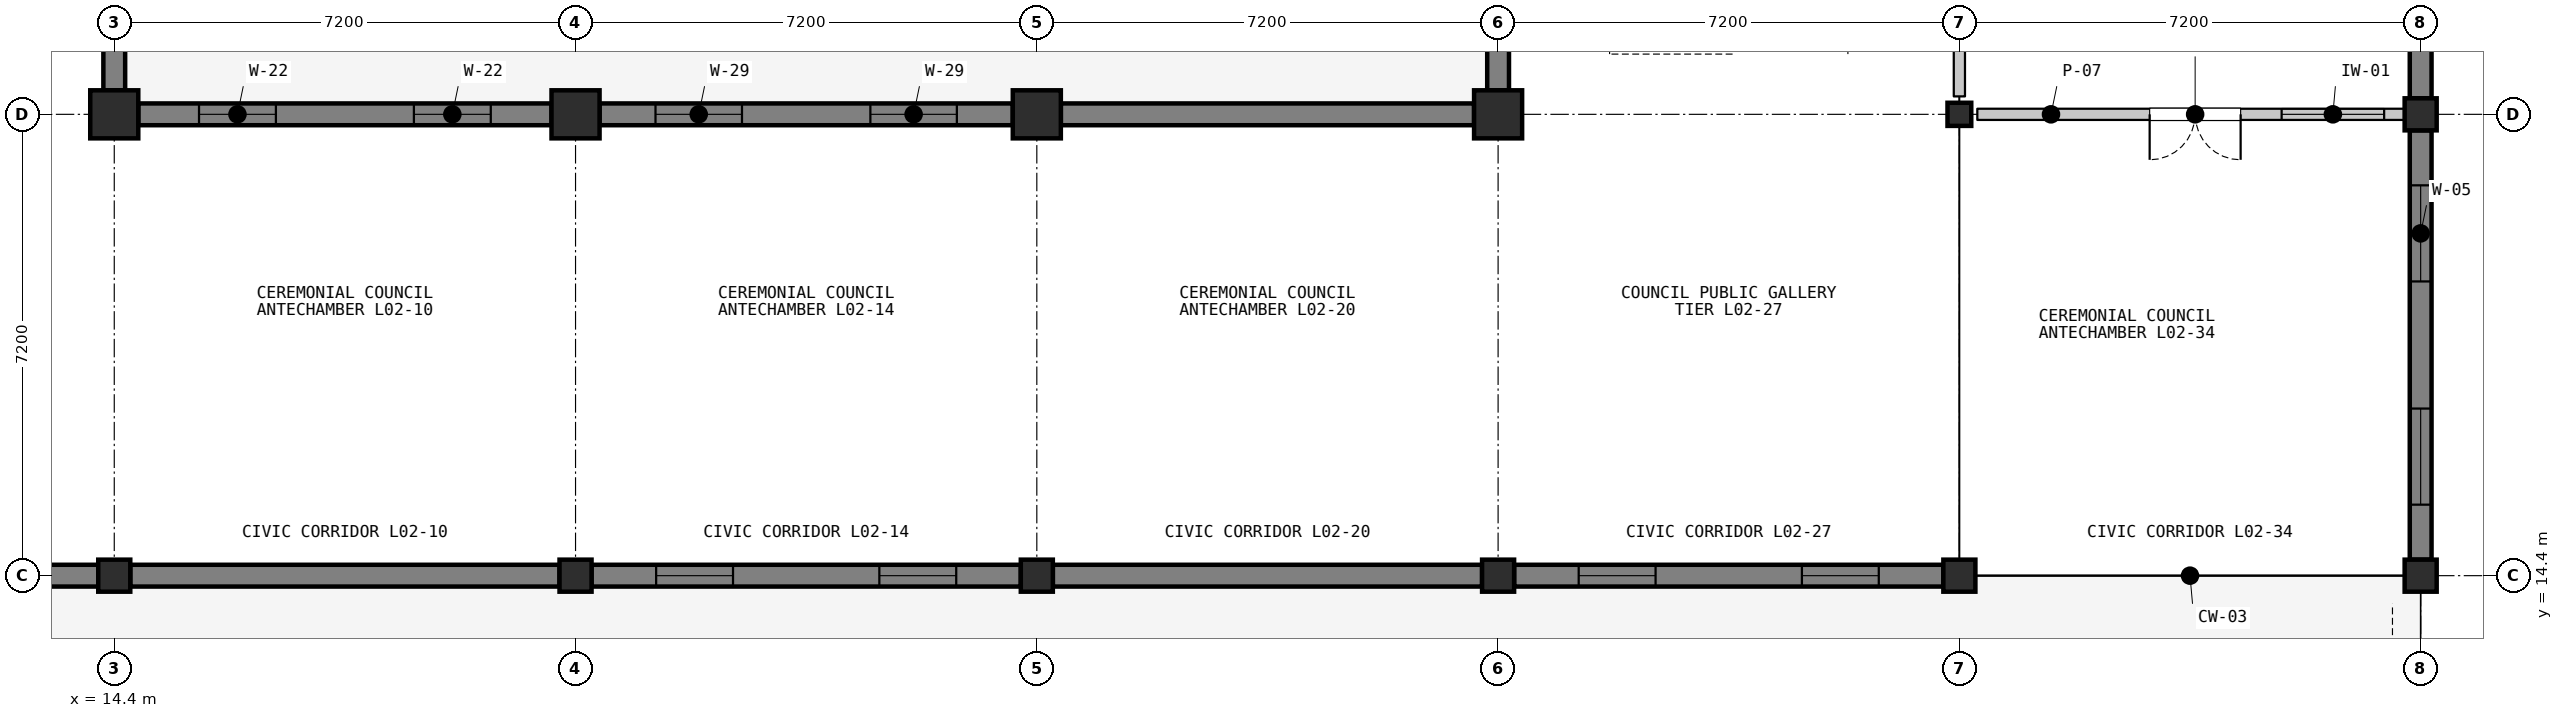
"""IFC4 building model, lengths in metres.
Left out: names, types, materials, properties, quantities, classifications, styles, units other than length and angle.
Written with IfcOpenShell. Run it as: python <this file> out.ifc"""

import sys

from ifc_helpers import new_model, si_unit, direction, frame, frame_2d, origin, origin_2d, place, context, subcontext, project, spatial, rectangle, i_section, extrude, element, fill, save


model = new_model("IFC4")
c1 = context("Model", 3, precision=1e-05, world=origin(), true_north=direction((0.0, 1.0)))
c2 = subcontext(c1, "Body", "Model", "MODEL_VIEW")
j1 = project(units=[si_unit("LENGTHUNIT", "METRE"), si_unit("PLANEANGLEUNIT", "RADIAN")], contexts=[c1])
p1 = place(None, origin())
s1 = spatial("IfcSite", under=j1, at=p1, CompositionType="ELEMENT")
p2 = place(p1, origin())
s2 = spatial("IfcBuilding", under=s1, at=p2, CompositionType="ELEMENT")
p3 = place(p2, frame((0.0, 0.0, 5.4)))
s3 = spatial("IfcBuildingStorey", under=s2, at=p3, CompositionType="ELEMENT", Elevation=5.4)
p4 = place(p3, frame((14.4, 14.4, 0.0), z_axis=(0.0, 0.0, 1.0), x_axis=(1.0, 0.0, 0.0)))
e1 = element("IfcColumn", 1, at=p4, inside=s3, PredefinedType="COLUMN", context=c2, shape_type="SweptSolid", body=[
    extrude(rectangle(XDim=0.5, YDim=0.5, at=origin_2d()), origin(), (0.0, 0.0, 1.0), 4.5),
])
p5 = place(p3, frame((14.4, 21.6, 0.0), z_axis=(0.0, 0.0, 1.0), x_axis=(1.0, 0.0, 0.0)))
e2 = element("IfcColumn", 2, at=p5, inside=s3, PredefinedType="COLUMN", context=c2, shape_type="SweptSolid", body=[
    extrude(rectangle(XDim=0.75, YDim=0.75, at=origin_2d()), origin(), (0.0, 0.0, 1.0), 4.5),
])
p6 = place(p3, frame((21.6, 14.4, 0.0), z_axis=(0.0, 0.0, 1.0), x_axis=(1.0, 0.0, 0.0)))
e3 = element("IfcColumn", 3, at=p6, inside=s3, PredefinedType="COLUMN", context=c2, shape_type="SweptSolid", body=[
    extrude(rectangle(XDim=0.5, YDim=0.5, at=origin_2d()), origin(), (0.0, 0.0, 1.0), 4.5),
])
p7 = place(p3, frame((21.6, 21.6, 0.0), z_axis=(0.0, 0.0, 1.0), x_axis=(1.0, 0.0, 0.0)))
e4 = element("IfcColumn", 4, at=p7, inside=s3, PredefinedType="COLUMN", context=c2, shape_type="SweptSolid", body=[
    extrude(rectangle(XDim=0.75, YDim=0.75, at=origin_2d()), origin(), (0.0, 0.0, 1.0), 4.5),
])
p8 = place(p3, frame((28.8, 14.4, 0.0), z_axis=(0.0, 0.0, 1.0), x_axis=(1.0, 0.0, 0.0)))
e5 = element("IfcColumn", 5, at=p8, inside=s3, PredefinedType="COLUMN", context=c2, shape_type="SweptSolid", body=[
    extrude(rectangle(XDim=0.5, YDim=0.5, at=origin_2d()), origin(), (0.0, 0.0, 1.0), 4.5),
])
p9 = place(p3, frame((28.8, 21.6, 0.0), z_axis=(0.0, 0.0, 1.0), x_axis=(1.0, 0.0, 0.0)))
e6 = element("IfcColumn", 6, at=p9, inside=s3, PredefinedType="COLUMN", context=c2, shape_type="SweptSolid", body=[
    extrude(rectangle(XDim=0.75, YDim=0.75, at=origin_2d()), origin(), (0.0, 0.0, 1.0), 4.5),
])
p10 = place(p3, frame((36.0, 14.4, 0.0), z_axis=(0.0, 0.0, 1.0), x_axis=(1.0, 0.0, 0.0)))
e7 = element("IfcColumn", 7, at=p10, inside=s3, PredefinedType="COLUMN", context=c2, shape_type="SweptSolid", body=[
    extrude(rectangle(XDim=0.5, YDim=0.5, at=origin_2d()), origin(), (0.0, 0.0, 1.0), 4.5),
])
p11 = place(p3, frame((36.0, 21.6, 0.0), z_axis=(0.0, 0.0, 1.0), x_axis=(1.0, 0.0, 0.0)))
e8 = element("IfcColumn", 8, at=p11, inside=s3, PredefinedType="COLUMN", context=c2, shape_type="SweptSolid", body=[
    extrude(rectangle(XDim=0.75, YDim=0.75, at=origin_2d()), origin(), (0.0, 0.0, 1.0), 4.5),
])
p12 = place(p3, frame((43.2, 14.4, 0.0), z_axis=(0.0, 0.0, 1.0), x_axis=(1.0, 0.0, 0.0)))
e9 = element("IfcColumn", 9, at=p12, inside=s3, PredefinedType="COLUMN", context=c2, shape_type="SweptSolid", body=[
    extrude(rectangle(XDim=0.5, YDim=0.5, at=origin_2d()), origin(), (0.0, 0.0, 1.0), 4.5),
])
p13 = place(p3, frame((43.2, 21.6, 0.0), z_axis=(0.0, 0.0, 1.0), x_axis=(1.0, 0.0, 0.0)))
e10 = element("IfcColumn", 10, at=p13, inside=s3, PredefinedType="COLUMN", context=c2, shape_type="SweptSolid", body=[
    extrude(i_section(OverallWidth=0.371, OverallDepth=0.361, WebThickness=0.012, FlangeThickness=0.02, FilletRadius=0.015, at=origin_2d()), origin(), (0.0, 0.0, 1.0), 4.5),
])
for number, where, z_axis, x_axis in (
    (11, (50.4, 14.4, 0.0), (0.0, 0.0, 1.0), (1.0, 0.0, 0.0)),
    (12, (50.4, 21.6, 0.0), (0.0, 0.0, 1.0), (1.0, 0.0, 0.0)),
):
    element("IfcColumn", number, at=place(p3, frame(where, z_axis=z_axis, x_axis=x_axis)), inside=s3, PredefinedType="COLUMN", context=c2, shape_type="SweptSolid", body=[
        extrude(rectangle(XDim=0.5, YDim=0.5, at=origin_2d()), origin(), (0.0, 0.0, 1.0), 4.5),
    ])
p14 = place(p3, frame((14.15, 14.4, 0.0), z_axis=(0.0, 0.0, 1.0), x_axis=(-1.0, 0.0, 0.0)))
e13 = element("IfcWall", 13, at=p14, inside=s3, PredefinedType="SOLIDWALL", context=c2, shape_type="SweptSolid", body=[
    extrude(rectangle(XDim=6.7, YDim=0.34, at=frame_2d((3.35, 0.0))), origin(), (0.0, 0.0, 1.0), 3.698),
])
p15 = place(p14, frame((2.5, 0.0, 0.0)))
e14 = element("IfcOpeningElement", 14, at=p15, cuts=e13, PredefinedType="OPENING", context=c2, shape_type="SweptSolid", body=[
    extrude(rectangle(XDim=1.7, YDim=2.25, at=frame_2d((0.85, 1.125))), frame((0.0, 0.18, 0.0), z_axis=(0.0, -1.0, 0.0), x_axis=(1.0, 0.0, 0.0)), (0.0, 0.0, 1.0), 0.36),
])
p16 = place(p3, frame((14.4, 28.425, 0.0), z_axis=(0.0, 0.0, 1.0), x_axis=(0.0, -1.0, 0.0)))
e15 = element("IfcWall", 15, at=p16, inside=s3, PredefinedType="SOLIDWALL", context=c2, shape_type="SweptSolid", body=[
    extrude(rectangle(XDim=6.45, YDim=0.34, at=frame_2d((3.225, 0.0))), origin(), (0.0, 0.0, 1.0), 3.767),
])
p17 = place(p3, frame((21.35, 14.4, 0.0), z_axis=(0.0, 0.0, 1.0), x_axis=(-1.0, 0.0, 0.0)))
e16 = element("IfcWall", 16, at=p17, inside=s3, PredefinedType="SOLIDWALL", context=c2, shape_type="SweptSolid", body=[
    extrude(rectangle(XDim=6.7, YDim=0.34, at=frame_2d((3.35, 0.0))), origin(), (0.0, 0.0, 1.0), 3.698),
])
p18 = place(p3, frame((14.775, 21.6, 0.0), z_axis=(0.0, 0.0, 1.0), x_axis=(1.0, 0.0, 0.0)))
e17 = element("IfcWall", 17, at=p18, inside=s3, PredefinedType="SOLIDWALL", context=c2, shape_type="SweptSolid", body=[
    extrude(rectangle(XDim=6.45, YDim=0.34, at=frame_2d((3.225, 0.0))), origin(), (0.0, 0.0, 1.0), 3.698),
])
p19 = place(p18, frame((0.948, 0.0, 0.95)))
e18 = element("IfcOpeningElement", 18, at=p19, cuts=e17, PredefinedType="OPENING", context=c2, shape_type="SweptSolid", body=[
    extrude(rectangle(XDim=1.2, YDim=1.7, at=frame_2d((0.6, 0.85))), frame((0.0, 0.18, 0.0), z_axis=(0.0, -1.0, 0.0), x_axis=(1.0, 0.0, 0.0)), (0.0, 0.0, 1.0), 0.36),
])
p20 = place(p18, frame((4.302, 0.0, 0.95)))
e19 = element("IfcOpeningElement", 19, at=p20, cuts=e17, PredefinedType="OPENING", context=c2, shape_type="SweptSolid", body=[
    extrude(rectangle(XDim=1.2, YDim=1.7, at=frame_2d((0.6, 0.85))), frame((0.0, 0.18, 0.0), z_axis=(0.0, -1.0, 0.0), x_axis=(1.0, 0.0, 0.0)), (0.0, 0.0, 1.0), 0.36),
])
p21 = place(p3, frame((28.55, 14.4, 0.0), z_axis=(0.0, 0.0, 1.0), x_axis=(-1.0, 0.0, 0.0)))
e20 = element("IfcWall", 20, at=p21, inside=s3, PredefinedType="SOLIDWALL", context=c2, shape_type="SweptSolid", body=[
    extrude(rectangle(XDim=6.7, YDim=0.34, at=frame_2d((3.35, 0.0))), origin(), (0.0, 0.0, 1.0), 3.698),
])
p22 = place(p21, frame((1.008, 0.0, 0.95)))
e21 = element("IfcOpeningElement", 21, at=p22, cuts=e20, PredefinedType="OPENING", context=c2, shape_type="SweptSolid", body=[
    extrude(rectangle(XDim=1.2, YDim=1.7, at=frame_2d((0.6, 0.85))), frame((0.0, 0.18, 0.0), z_axis=(0.0, -1.0, 0.0), x_axis=(1.0, 0.0, 0.0)), (0.0, 0.0, 1.0), 0.36),
])
p23 = place(p21, frame((4.492, 0.0, 0.95)))
e22 = element("IfcOpeningElement", 22, at=p23, cuts=e20, PredefinedType="OPENING", context=c2, shape_type="SweptSolid", body=[
    extrude(rectangle(XDim=1.2, YDim=1.7, at=frame_2d((0.6, 0.85))), frame((0.0, 0.18, 0.0), z_axis=(0.0, -1.0, 0.0), x_axis=(1.0, 0.0, 0.0)), (0.0, 0.0, 1.0), 0.36),
])
p24 = place(p3, frame((21.975, 21.6, 0.0), z_axis=(0.0, 0.0, 1.0), x_axis=(1.0, 0.0, 0.0)))
e23 = element("IfcWall", 23, at=p24, inside=s3, PredefinedType="SOLIDWALL", context=c2, shape_type="SweptSolid", body=[
    extrude(rectangle(XDim=6.45, YDim=0.34, at=frame_2d((3.225, 0.0))), origin(), (0.0, 0.0, 1.0), 3.698),
])
p25 = place(p24, frame((0.873, 0.0, 0.95)))
e24 = element("IfcOpeningElement", 24, at=p25, cuts=e23, PredefinedType="OPENING", context=c2, shape_type="SweptSolid", body=[
    extrude(rectangle(XDim=1.35, YDim=2.15, at=frame_2d((0.675, 1.075))), frame((0.0, 0.18, 0.0), z_axis=(0.0, -1.0, 0.0), x_axis=(1.0, 0.0, 0.0)), (0.0, 0.0, 1.0), 0.36),
])
p26 = place(p24, frame((4.227, 0.0, 0.95)))
e25 = element("IfcOpeningElement", 25, at=p26, cuts=e23, PredefinedType="OPENING", context=c2, shape_type="SweptSolid", body=[
    extrude(rectangle(XDim=1.35, YDim=2.15, at=frame_2d((0.675, 1.075))), frame((0.0, 0.18, 0.0), z_axis=(0.0, -1.0, 0.0), x_axis=(1.0, 0.0, 0.0)), (0.0, 0.0, 1.0), 0.36),
])
p27 = place(p3, frame((35.75, 14.4, 0.0), z_axis=(0.0, 0.0, 1.0), x_axis=(-1.0, 0.0, 0.0)))
e26 = element("IfcWall", 26, at=p27, inside=s3, PredefinedType="SOLIDWALL", context=c2, shape_type="SweptSolid", body=[
    extrude(rectangle(XDim=6.7, YDim=0.34, at=frame_2d((3.35, 0.0))), origin(), (0.0, 0.0, 1.0), 3.698),
])
p28 = place(p3, frame((29.175, 21.6, 0.0), z_axis=(0.0, 0.0, 1.0), x_axis=(1.0, 0.0, 0.0)))
e27 = element("IfcWall", 27, at=p28, inside=s3, PredefinedType="SOLIDWALL", context=c2, shape_type="SweptSolid", body=[
    extrude(rectangle(XDim=6.45, YDim=0.34, at=frame_2d((3.225, 0.0))), origin(), (0.0, 0.0, 1.0), 3.698),
])
p29 = place(p3, frame((42.95, 14.4, 0.0), z_axis=(0.0, 0.0, 1.0), x_axis=(-1.0, 0.0, 0.0)))
e28 = element("IfcWall", 28, at=p29, inside=s3, PredefinedType="SOLIDWALL", context=c2, shape_type="SweptSolid", body=[
    extrude(rectangle(XDim=6.7, YDim=0.34, at=frame_2d((3.35, 0.0))), origin(), (0.0, 0.0, 1.0), 3.698),
])
p30 = place(p29, frame((1.008, 0.0, 0.95)))
e29 = element("IfcOpeningElement", 29, at=p30, cuts=e28, PredefinedType="OPENING", context=c2, shape_type="SweptSolid", body=[
    extrude(rectangle(XDim=1.2, YDim=1.7, at=frame_2d((0.6, 0.85))), frame((0.0, 0.18, 0.0), z_axis=(0.0, -1.0, 0.0), x_axis=(1.0, 0.0, 0.0)), (0.0, 0.0, 1.0), 0.36),
])
p31 = place(p29, frame((4.492, 0.0, 0.95)))
e30 = element("IfcOpeningElement", 30, at=p31, cuts=e28, PredefinedType="OPENING", context=c2, shape_type="SweptSolid", body=[
    extrude(rectangle(XDim=1.2, YDim=1.7, at=frame_2d((0.6, 0.85))), frame((0.0, 0.18, 0.0), z_axis=(0.0, -1.0, 0.0), x_axis=(1.0, 0.0, 0.0)), (0.0, 0.0, 1.0), 0.36),
])
p32 = place(p3, frame((36.0, 21.975, 0.0), z_axis=(0.0, 0.0, 1.0), x_axis=(0.0, 1.0, 0.0)))
e31 = element("IfcWall", 31, at=p32, inside=s3, PredefinedType="SOLIDWALL", context=c2, shape_type="SweptSolid", body=[
    extrude(rectangle(XDim=6.45, YDim=0.34, at=frame_2d((3.225, 0.0))), origin(), (0.0, 0.0, 1.0), 3.767),
])
p33 = place(p32, frame((0.873, 0.0, 0.95)))
e32 = element("IfcOpeningElement", 32, at=p33, cuts=e31, PredefinedType="OPENING", context=c2, shape_type="SweptSolid", body=[
    extrude(rectangle(XDim=1.35, YDim=2.15, at=frame_2d((0.675, 1.075))), frame((0.0, 0.18, 0.0), z_axis=(0.0, -1.0, 0.0), x_axis=(1.0, 0.0, 0.0)), (0.0, 0.0, 1.0), 0.36),
])
p34 = place(p32, frame((4.227, 0.0, 0.95)))
e33 = element("IfcOpeningElement", 33, at=p34, cuts=e31, PredefinedType="OPENING", context=c2, shape_type="SweptSolid", body=[
    extrude(rectangle(XDim=1.35, YDim=2.15, at=frame_2d((0.675, 1.075))), frame((0.0, 0.18, 0.0), z_axis=(0.0, -1.0, 0.0), x_axis=(1.0, 0.0, 0.0)), (0.0, 0.0, 1.0), 0.36),
])
p35 = place(p3, frame((50.4, 21.35, 0.0), z_axis=(0.0, 0.0, 1.0), x_axis=(0.0, -1.0, 0.0)))
e34 = element("IfcWall", 34, at=p35, inside=s3, PredefinedType="SOLIDWALL", context=c2, shape_type="SweptSolid", body=[
    extrude(rectangle(XDim=6.7, YDim=0.34, at=frame_2d((3.35, 0.0))), origin(), (0.0, 0.0, 1.0), 3.767),
])
p36 = place(p35, frame((0.858, 0.0, 0.95)))
e35 = element("IfcOpeningElement", 35, at=p36, cuts=e34, PredefinedType="OPENING", context=c2, shape_type="SweptSolid", body=[
    extrude(rectangle(XDim=1.5, YDim=2.4, at=frame_2d((0.75, 1.2))), frame((0.0, 0.18, 0.0), z_axis=(0.0, -1.0, 0.0), x_axis=(1.0, 0.0, 0.0)), (0.0, 0.0, 1.0), 0.36),
])
p37 = place(p35, frame((4.342, 0.0, 0.95)))
e36 = element("IfcOpeningElement", 36, at=p37, cuts=e34, PredefinedType="OPENING", context=c2, shape_type="SweptSolid", body=[
    extrude(rectangle(XDim=1.5, YDim=2.4, at=frame_2d((0.75, 1.2))), frame((0.0, 0.18, 0.0), z_axis=(0.0, -1.0, 0.0), x_axis=(1.0, 0.0, 0.0)), (0.0, 0.0, 1.0), 0.36),
])
p38 = place(p3, frame((50.4, 28.55, 0.0), z_axis=(0.0, 0.0, 1.0), x_axis=(0.0, -1.0, 0.0)))
e37 = element("IfcWall", 37, at=p38, inside=s3, PredefinedType="SOLIDWALL", context=c2, shape_type="SweptSolid", body=[
    extrude(rectangle(XDim=6.7, YDim=0.34, at=frame_2d((3.35, 0.0))), origin(), (0.0, 0.0, 1.0), 3.767),
])
p39 = place(p38, frame((1.008, 0.0, 0.95)))
e38 = element("IfcOpeningElement", 38, at=p39, cuts=e37, PredefinedType="OPENING", context=c2, shape_type="SweptSolid", body=[
    extrude(rectangle(XDim=1.2, YDim=2.4, at=frame_2d((0.6, 1.2))), frame((0.0, 0.18, 0.0), z_axis=(0.0, -1.0, 0.0), x_axis=(1.0, 0.0, 0.0)), (0.0, 0.0, 1.0), 0.36),
])
p40 = place(p38, frame((4.492, 0.0, 0.95)))
e39 = element("IfcOpeningElement", 39, at=p40, cuts=e37, PredefinedType="OPENING", context=c2, shape_type="SweptSolid", body=[
    extrude(rectangle(XDim=1.2, YDim=2.4, at=frame_2d((0.6, 1.2))), frame((0.0, 0.18, 0.0), z_axis=(0.0, -1.0, 0.0), x_axis=(1.0, 0.0, 0.0)), (0.0, 0.0, 1.0), 0.36),
])
p41 = place(p3, frame((50.28, 21.6, 0.0), z_axis=(0.0, 0.0, 1.0), x_axis=(-1.0, 0.0, 0.0)))
e40 = element("IfcWall", 40, at=p41, inside=s3, PredefinedType="PARTITIONING", context=c2, shape_type="SweptSolid", body=[
    extrude(rectangle(XDim=6.8, YDim=0.175, at=frame_2d((3.4, 0.0))), origin(), (0.0, 0.0, 1.0), 3.688),
])
p42 = place(p41, frame((2.69, 0.0, 0.0)))
e41 = element("IfcOpeningElement", 41, at=p42, cuts=e40, PredefinedType="OPENING", context=c2, shape_type="SweptSolid", body=[
    extrude(rectangle(XDim=1.42, YDim=2.26, at=frame_2d((0.71, 1.13))), frame((0.0, 0.097, 0.0), z_axis=(0.0, -1.0, 0.0), x_axis=(1.0, 0.0, 0.0)), (0.0, 0.0, 1.0), 0.195),
])
p43 = place(p41, frame((0.45, 0.0, 1.05)))
e42 = element("IfcOpeningElement", 42, at=p43, cuts=e40, PredefinedType="OPENING", context=c2, shape_type="SweptSolid", body=[
    extrude(rectangle(XDim=1.6, YDim=1.2, at=frame_2d((0.8, 0.6))), frame((0.0, 0.097, 0.0), z_axis=(0.0, -1.0, 0.0), x_axis=(1.0, 0.0, 0.0)), (0.0, 0.0, 1.0), 0.195),
])
p44 = place(p3, frame((43.2, 21.88, 0.0), z_axis=(0.0, 0.0, 1.0), x_axis=(0.0, 1.0, 0.0)))
e43 = element("IfcWall", 43, at=p44, inside=s3, PredefinedType="PARTITIONING", context=c2, shape_type="SweptSolid", body=[
    extrude(rectangle(XDim=6.64, YDim=0.175, at=frame_2d((3.32, 0.0))), origin(), (0.0, 0.0, 1.0), 3.757),
])
p45 = place(p19, origin())
e44 = element("IfcWindow", 44, at=p45, inside=s3, PartitioningType="SINGLE_PANEL", PredefinedType="WINDOW", context=c2, shape_type="SweptSolid", body=[
    extrude(rectangle(XDim=1.2, YDim=1.7, at=frame_2d((0.6, 0.85))), frame((0.0, 0.03, 0.0), z_axis=(0.0, -1.0, 0.0), x_axis=(1.0, 0.0, 0.0)), (0.0, 0.0, 1.0), 0.06),
])
fill(e18, e44)
p46 = place(p20, origin())
e45 = element("IfcWindow", 45, at=p46, inside=s3, PartitioningType="SINGLE_PANEL", PredefinedType="WINDOW", context=c2, shape_type="SweptSolid", body=[
    extrude(rectangle(XDim=1.2, YDim=1.7, at=frame_2d((0.6, 0.85))), frame((0.0, 0.03, 0.0), z_axis=(0.0, -1.0, 0.0), x_axis=(1.0, 0.0, 0.0)), (0.0, 0.0, 1.0), 0.06),
])
fill(e19, e45)
p47 = place(p22, origin())
e46 = element("IfcWindow", 46, at=p47, inside=s3, PartitioningType="SINGLE_PANEL", PredefinedType="WINDOW", context=c2, shape_type="SweptSolid", body=[
    extrude(rectangle(XDim=1.2, YDim=1.7, at=frame_2d((0.6, 0.85))), frame((0.0, 0.03, 0.0), z_axis=(0.0, -1.0, 0.0), x_axis=(1.0, 0.0, 0.0)), (0.0, 0.0, 1.0), 0.06),
])
fill(e21, e46)
p48 = place(p23, origin())
e47 = element("IfcWindow", 47, at=p48, inside=s3, PartitioningType="SINGLE_PANEL", PredefinedType="WINDOW", context=c2, shape_type="SweptSolid", body=[
    extrude(rectangle(XDim=1.2, YDim=1.7, at=frame_2d((0.6, 0.85))), frame((0.0, 0.03, 0.0), z_axis=(0.0, -1.0, 0.0), x_axis=(1.0, 0.0, 0.0)), (0.0, 0.0, 1.0), 0.06),
])
fill(e22, e47)
p49 = place(p25, origin())
e48 = element("IfcWindow", 48, at=p49, inside=s3, PartitioningType="SINGLE_PANEL", PredefinedType="WINDOW", context=c2, shape_type="SweptSolid", body=[
    extrude(rectangle(XDim=1.35, YDim=2.15, at=frame_2d((0.675, 1.075))), frame((0.0, 0.03, 0.0), z_axis=(0.0, -1.0, 0.0), x_axis=(1.0, 0.0, 0.0)), (0.0, 0.0, 1.0), 0.06),
])
fill(e24, e48)
p50 = place(p26, origin())
e49 = element("IfcWindow", 49, at=p50, inside=s3, PartitioningType="SINGLE_PANEL", PredefinedType="WINDOW", context=c2, shape_type="SweptSolid", body=[
    extrude(rectangle(XDim=1.35, YDim=2.15, at=frame_2d((0.675, 1.075))), frame((0.0, 0.03, 0.0), z_axis=(0.0, -1.0, 0.0), x_axis=(1.0, 0.0, 0.0)), (0.0, 0.0, 1.0), 0.06),
])
fill(e25, e49)
p51 = place(p30, origin())
e50 = element("IfcWindow", 50, at=p51, inside=s3, PartitioningType="SINGLE_PANEL", PredefinedType="WINDOW", context=c2, shape_type="SweptSolid", body=[
    extrude(rectangle(XDim=1.2, YDim=1.7, at=frame_2d((0.6, 0.85))), frame((0.0, 0.03, 0.0), z_axis=(0.0, -1.0, 0.0), x_axis=(1.0, 0.0, 0.0)), (0.0, 0.0, 1.0), 0.06),
])
fill(e29, e50)
p52 = place(p31, origin())
e51 = element("IfcWindow", 51, at=p52, inside=s3, PartitioningType="SINGLE_PANEL", PredefinedType="WINDOW", context=c2, shape_type="SweptSolid", body=[
    extrude(rectangle(XDim=1.2, YDim=1.7, at=frame_2d((0.6, 0.85))), frame((0.0, 0.03, 0.0), z_axis=(0.0, -1.0, 0.0), x_axis=(1.0, 0.0, 0.0)), (0.0, 0.0, 1.0), 0.06),
])
fill(e30, e51)
p53 = place(p36, origin())
e52 = element("IfcWindow", 52, at=p53, inside=s3, PartitioningType="SINGLE_PANEL", PredefinedType="WINDOW", context=c2, shape_type="SweptSolid", body=[
    extrude(rectangle(XDim=1.5, YDim=2.4, at=frame_2d((0.75, 1.2))), frame((0.0, 0.03, 0.0), z_axis=(0.0, -1.0, 0.0), x_axis=(1.0, 0.0, 0.0)), (0.0, 0.0, 1.0), 0.06),
])
fill(e35, e52)
p54 = place(p37, origin())
e53 = element("IfcWindow", 53, at=p54, inside=s3, PartitioningType="SINGLE_PANEL", PredefinedType="WINDOW", context=c2, shape_type="SweptSolid", body=[
    extrude(rectangle(XDim=1.5, YDim=2.4, at=frame_2d((0.75, 1.2))), frame((0.0, 0.03, 0.0), z_axis=(0.0, -1.0, 0.0), x_axis=(1.0, 0.0, 0.0)), (0.0, 0.0, 1.0), 0.06),
])
fill(e36, e53)
p55 = place(p42, origin())
e54 = element("IfcDoor", 54, at=p55, inside=s3, OperationType="DOUBLE_DOOR_SINGLE_SWING", PredefinedType="DOOR", context=c2, shape_type="SweptSolid", body=[
    extrude(rectangle(XDim=1.42, YDim=2.26, at=frame_2d((0.71, 1.13))), frame((0.0, 0.025, 0.0), z_axis=(0.0, -1.0, 0.0), x_axis=(1.0, 0.0, 0.0)), (0.0, 0.0, 1.0), 0.05),
])
fill(e41, e54)
p56 = place(p43, origin())
e55 = element("IfcWindow", 55, at=p56, inside=s3, PartitioningType="SINGLE_PANEL", PredefinedType="WINDOW", context=c2, shape_type="SweptSolid", body=[
    extrude(rectangle(XDim=1.6, YDim=1.2, at=frame_2d((0.8, 0.6))), frame((0.0, 0.03, 0.0), z_axis=(0.0, -1.0, 0.0), x_axis=(1.0, 0.0, 0.0)), (0.0, 0.0, 1.0), 0.06),
])
fill(e42, e55)
save(model, sys.argv[1])
